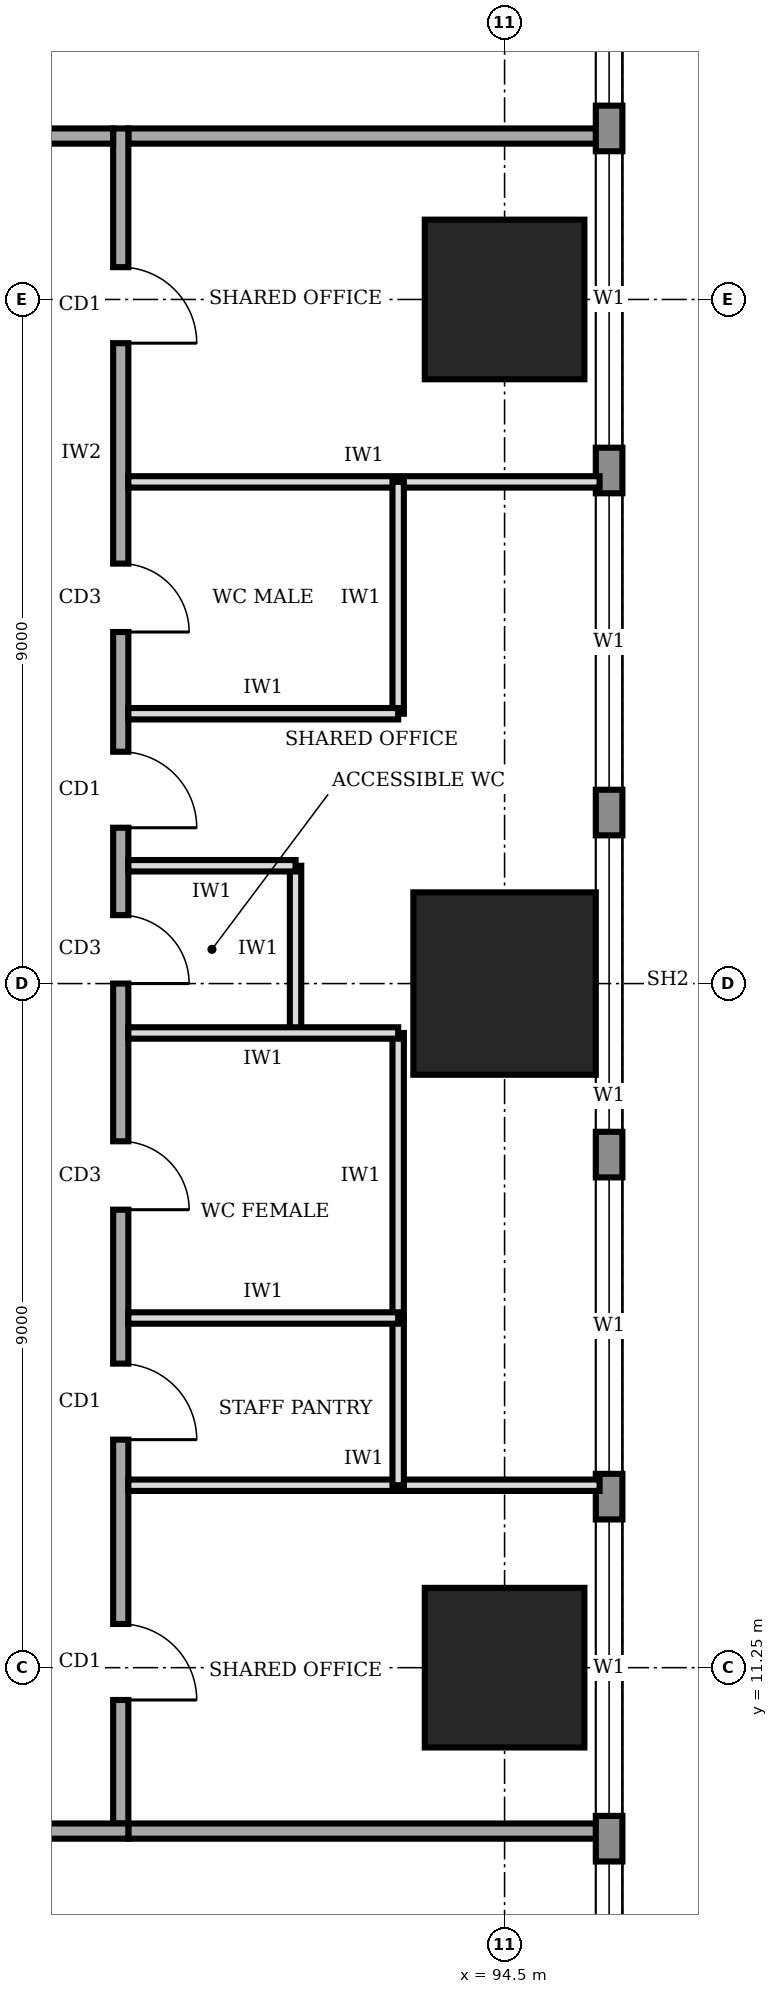
"""IFC4 building model, lengths in metres.
Left out: names, types, materials, properties, quantities, classifications, styles, units other than length and angle.
Written with IfcOpenShell. Run it as: python <this file> out.ifc"""

import sys

from ifc_helpers import new_model, si_unit, direction, frame, frame_2d, origin, origin_2d, place, context, subcontext, project, spatial, rectangle, extrude, element, fill, save


model = new_model("IFC4")
c1 = context("Model", 3, precision=1e-05, world=origin(), true_north=direction((0.0, 1.0)))
c2 = subcontext(c1, "Body", "Model", "MODEL_VIEW")
j1 = project(units=[si_unit("LENGTHUNIT", "METRE"), si_unit("PLANEANGLEUNIT", "RADIAN")], contexts=[c1])
p1 = place(None, origin())
s1 = spatial("IfcSite", under=j1, at=p1, CompositionType="ELEMENT")
p2 = place(p1, origin())
s2 = spatial("IfcBuilding", under=s1, at=p2, CompositionType="ELEMENT")
p3 = place(p2, frame((0.0, 0.0, 121.0)))
s3 = spatial("IfcBuildingStorey", under=s2, at=p3, CompositionType="ELEMENT", Elevation=121.0)
p4 = place(p3, frame((94.5, 11.25, 0.0), z_axis=(0.0, 0.0, 1.0), x_axis=(1.0, 0.0, 0.0)))
e1 = element("IfcColumn", 1, at=p4, inside=s3, PredefinedType="COLUMN", context=c2, shape_type="SweptSolid", body=[
    extrude(rectangle(XDim=2.1, YDim=2.1, at=origin_2d()), origin(), (0.0, 0.0, 1.0), 4.0),
])
p5 = place(p3, frame((94.5, 20.25, 0.0), z_axis=(0.0, 0.0, 1.0), x_axis=(1.0, 0.0, 0.0)))
e2 = element("IfcColumn", 2, at=p5, inside=s3, PredefinedType="COLUMN", context=c2, shape_type="SweptSolid", body=[
    extrude(rectangle(XDim=2.4, YDim=2.4, at=origin_2d()), origin(), (0.0, 0.0, 1.0), 4.0),
])
p6 = place(p3, frame((94.5, 29.25, 0.0), z_axis=(0.0, 0.0, 1.0), x_axis=(1.0, 0.0, 0.0)))
e3 = element("IfcColumn", 3, at=p6, inside=s3, PredefinedType="COLUMN", context=c2, shape_type="SweptSolid", body=[
    extrude(rectangle(XDim=2.1, YDim=2.1, at=origin_2d()), origin(), (0.0, 0.0, 1.0), 4.0),
])
p7 = place(p3, frame((95.875, 3.32, 0.0), z_axis=(0.0, 0.0, 1.0), x_axis=(0.0, 1.0, 0.0)))
e4 = element("IfcWall", 4, at=p7, inside=s3, PredefinedType="STANDARD", context=c2, shape_type="SweptSolid", body=[
    extrude(rectangle(XDim=33.96, YDim=0.35, at=frame_2d((16.98, 0.0))), origin(), (0.0, 0.0, 1.0), 3.75),
])
p8 = place(p7, frame((1.48, 0.0, 0.9)))
e5 = element("IfcOpeningElement", 5, at=p8, cuts=e4, PredefinedType="OPENING", context=c2, shape_type="SweptSolid", body=[
    extrude(rectangle(XDim=3.9, YDim=2.2, at=frame_2d((1.95, 1.1))), frame((0.0, 0.185, 0.0), z_axis=(0.0, -1.0, 0.0), x_axis=(1.0, 0.0, 0.0)), (0.0, 0.0, 1.0), 0.37),
])
p9 = place(p7, frame((5.98, 0.0, 0.9)))
e6 = element("IfcOpeningElement", 6, at=p9, cuts=e4, PredefinedType="OPENING", context=c2, shape_type="SweptSolid", body=[
    extrude(rectangle(XDim=3.9, YDim=2.2, at=frame_2d((1.95, 1.1))), frame((0.0, 0.185, 0.0), z_axis=(0.0, -1.0, 0.0), x_axis=(1.0, 0.0, 0.0)), (0.0, 0.0, 1.0), 0.37),
])
p10 = place(p7, frame((10.48, 0.0, 0.9)))
e7 = element("IfcOpeningElement", 7, at=p10, cuts=e4, PredefinedType="OPENING", context=c2, shape_type="SweptSolid", body=[
    extrude(rectangle(XDim=3.9, YDim=2.2, at=frame_2d((1.95, 1.1))), frame((0.0, 0.185, 0.0), z_axis=(0.0, -1.0, 0.0), x_axis=(1.0, 0.0, 0.0)), (0.0, 0.0, 1.0), 0.37),
])
p11 = place(p7, frame((14.98, 0.0, 0.9)))
e8 = element("IfcOpeningElement", 8, at=p11, cuts=e4, PredefinedType="OPENING", context=c2, shape_type="SweptSolid", body=[
    extrude(rectangle(XDim=3.9, YDim=2.2, at=frame_2d((1.95, 1.1))), frame((0.0, 0.185, 0.0), z_axis=(0.0, -1.0, 0.0), x_axis=(1.0, 0.0, 0.0)), (0.0, 0.0, 1.0), 0.37),
])
p12 = place(p7, frame((19.48, 0.0, 0.9)))
e9 = element("IfcOpeningElement", 9, at=p12, cuts=e4, PredefinedType="OPENING", context=c2, shape_type="SweptSolid", body=[
    extrude(rectangle(XDim=3.9, YDim=2.2, at=frame_2d((1.95, 1.1))), frame((0.0, 0.185, 0.0), z_axis=(0.0, -1.0, 0.0), x_axis=(1.0, 0.0, 0.0)), (0.0, 0.0, 1.0), 0.37),
])
p13 = place(p7, frame((23.98, 0.0, 0.9)))
e10 = element("IfcOpeningElement", 10, at=p13, cuts=e4, PredefinedType="OPENING", context=c2, shape_type="SweptSolid", body=[
    extrude(rectangle(XDim=3.9, YDim=2.2, at=frame_2d((1.95, 1.1))), frame((0.0, 0.185, 0.0), z_axis=(0.0, -1.0, 0.0), x_axis=(1.0, 0.0, 0.0)), (0.0, 0.0, 1.0), 0.37),
])
p14 = place(p7, frame((28.48, 0.0, 0.9)))
e11 = element("IfcOpeningElement", 11, at=p14, cuts=e4, PredefinedType="OPENING", context=c2, shape_type="SweptSolid", body=[
    extrude(rectangle(XDim=3.9, YDim=2.2, at=frame_2d((1.95, 1.1))), frame((0.0, 0.185, 0.0), z_axis=(0.0, -1.0, 0.0), x_axis=(1.0, 0.0, 0.0)), (0.0, 0.0, 1.0), 0.37),
])
p15 = place(p3, frame((71.15, 9.1, 0.0), z_axis=(0.0, 0.0, 1.0), x_axis=(1.0, 0.0, 0.0)))
e12 = element("IfcWall", 12, at=p15, inside=s3, PredefinedType="SOLIDWALL", context=c2, shape_type="SweptSolid", body=[
    extrude(rectangle(XDim=18.4, YDim=0.2, at=frame_2d((9.2, 0.0))), origin(), (0.0, 0.0, 1.0), 3.75),
])
p16 = place(p15, frame((2.075, 0.0, 0.0)))
e13 = element("IfcOpeningElement", 13, at=p16, cuts=e12, PredefinedType="OPENING", context=c2, shape_type="SweptSolid", body=[
    extrude(rectangle(XDim=1.0, YDim=2.1, at=frame_2d((0.5, 1.05))), frame((0.0, 0.11, 0.0), z_axis=(0.0, -1.0, 0.0), x_axis=(1.0, 0.0, 0.0)), (0.0, 0.0, 1.0), 0.22),
])
p17 = place(p15, frame((9.35, 0.0, 0.0)))
e14 = element("IfcOpeningElement", 14, at=p17, cuts=e12, PredefinedType="OPENING", context=c2, shape_type="SweptSolid", body=[
    extrude(rectangle(XDim=1.0, YDim=2.1, at=frame_2d((0.5, 1.05))), frame((0.0, 0.11, 0.0), z_axis=(0.0, -1.0, 0.0), x_axis=(1.0, 0.0, 0.0)), (0.0, 0.0, 1.0), 0.22),
])
p18 = place(p15, frame((15.875, 0.0, 0.0)))
e15 = element("IfcOpeningElement", 15, at=p18, cuts=e12, PredefinedType="OPENING", context=c2, shape_type="SweptSolid", body=[
    extrude(rectangle(XDim=1.0, YDim=2.1, at=frame_2d((0.5, 1.05))), frame((0.0, 0.11, 0.0), z_axis=(0.0, -1.0, 0.0), x_axis=(1.0, 0.0, 0.0)), (0.0, 0.0, 1.0), 0.22),
])
p19 = place(p3, frame((89.45, 9.2, 0.0), z_axis=(0.0, 0.0, 1.0), x_axis=(0.0, 1.0, 0.0)))
e16 = element("IfcWall", 16, at=p19, inside=s3, PredefinedType="SOLIDWALL", context=c2, shape_type="SweptSolid", body=[
    extrude(rectangle(XDim=22.3, YDim=0.2, at=frame_2d((11.15, 0.0))), origin(), (0.0, 0.0, 1.0), 3.75),
])
p20 = place(p19, frame((1.625, 0.0, 0.0)))
e17 = element("IfcOpeningElement", 17, at=p20, cuts=e16, PredefinedType="OPENING", context=c2, shape_type="SweptSolid", body=[
    extrude(rectangle(XDim=1.0, YDim=2.1, at=frame_2d((0.5, 1.05))), frame((0.0, 0.11, 0.0), z_axis=(0.0, -1.0, 0.0), x_axis=(1.0, 0.0, 0.0)), (0.0, 0.0, 1.0), 0.22),
])
p21 = place(p19, frame((5.05, 0.0, 0.0)))
e18 = element("IfcOpeningElement", 18, at=p21, cuts=e16, PredefinedType="OPENING", context=c2, shape_type="SweptSolid", body=[
    extrude(rectangle(XDim=1.0, YDim=2.1, at=frame_2d((0.5, 1.05))), frame((0.0, 0.11, 0.0), z_axis=(0.0, -1.0, 0.0), x_axis=(1.0, 0.0, 0.0)), (0.0, 0.0, 1.0), 0.22),
])
p22 = place(p19, frame((8.075, 0.0, 0.0)))
e19 = element("IfcOpeningElement", 19, at=p22, cuts=e16, PredefinedType="OPENING", context=c2, shape_type="SweptSolid", body=[
    extrude(rectangle(XDim=0.9, YDim=2.1, at=frame_2d((0.45, 1.05))), frame((0.0, 0.11, 0.0), z_axis=(0.0, -1.0, 0.0), x_axis=(1.0, 0.0, 0.0)), (0.0, 0.0, 1.0), 0.22),
])
p23 = place(p19, frame((11.05, 0.0, 0.0)))
e20 = element("IfcOpeningElement", 20, at=p23, cuts=e16, PredefinedType="OPENING", context=c2, shape_type="SweptSolid", body=[
    extrude(rectangle(XDim=0.9, YDim=2.1, at=frame_2d((0.45, 1.05))), frame((0.0, 0.11, 0.0), z_axis=(0.0, -1.0, 0.0), x_axis=(1.0, 0.0, 0.0)), (0.0, 0.0, 1.0), 0.22),
])
p24 = place(p19, frame((15.675, 0.0, 0.0)))
e21 = element("IfcOpeningElement", 21, at=p24, cuts=e16, PredefinedType="OPENING", context=c2, shape_type="SweptSolid", body=[
    extrude(rectangle(XDim=0.9, YDim=2.1, at=frame_2d((0.45, 1.05))), frame((0.0, 0.11, 0.0), z_axis=(0.0, -1.0, 0.0), x_axis=(1.0, 0.0, 0.0)), (0.0, 0.0, 1.0), 0.22),
])
p25 = place(p19, frame((13.1, 0.0, 0.0)))
e22 = element("IfcOpeningElement", 22, at=p25, cuts=e16, PredefinedType="OPENING", context=c2, shape_type="SweptSolid", body=[
    extrude(rectangle(XDim=1.0, YDim=2.1, at=frame_2d((0.5, 1.05))), frame((0.0, 0.11, 0.0), z_axis=(0.0, -1.0, 0.0), x_axis=(1.0, 0.0, 0.0)), (0.0, 0.0, 1.0), 0.22),
])
p26 = place(p19, frame((19.475, 0.0, 0.0)))
e23 = element("IfcOpeningElement", 23, at=p26, cuts=e16, PredefinedType="OPENING", context=c2, shape_type="SweptSolid", body=[
    extrude(rectangle(XDim=1.0, YDim=2.1, at=frame_2d((0.5, 1.05))), frame((0.0, 0.11, 0.0), z_axis=(0.0, -1.0, 0.0), x_axis=(1.0, 0.0, 0.0)), (0.0, 0.0, 1.0), 0.22),
])
p27 = place(p3, frame((89.35, 31.4, 0.0), z_axis=(0.0, 0.0, 1.0), x_axis=(-1.0, 0.0, 0.0)))
e24 = element("IfcWall", 24, at=p27, inside=s3, PredefinedType="SOLIDWALL", context=c2, shape_type="SweptSolid", body=[
    extrude(rectangle(XDim=18.4, YDim=0.2, at=frame_2d((9.2, 0.0))), origin(), (0.0, 0.0, 1.0), 3.75),
])
p28 = place(p27, frame((14.725, 0.0, 0.0)))
e25 = element("IfcOpeningElement", 25, at=p28, cuts=e24, PredefinedType="OPENING", context=c2, shape_type="SweptSolid", body=[
    extrude(rectangle(XDim=1.8, YDim=2.1, at=frame_2d((0.9, 1.05))), frame((0.0, 0.11, 0.0), z_axis=(0.0, -1.0, 0.0), x_axis=(1.0, 0.0, 0.0)), (0.0, 0.0, 1.0), 0.22),
])
p29 = place(p27, frame((7.85, 0.0, 0.0)))
e26 = element("IfcOpeningElement", 26, at=p29, cuts=e24, PredefinedType="OPENING", context=c2, shape_type="SweptSolid", body=[
    extrude(rectangle(XDim=1.0, YDim=2.1, at=frame_2d((0.5, 1.05))), frame((0.0, 0.11, 0.0), z_axis=(0.0, -1.0, 0.0), x_axis=(1.0, 0.0, 0.0)), (0.0, 0.0, 1.0), 0.22),
])
p30 = place(p27, frame((1.325, 0.0, 0.0)))
e27 = element("IfcOpeningElement", 27, at=p30, cuts=e24, PredefinedType="OPENING", context=c2, shape_type="SweptSolid", body=[
    extrude(rectangle(XDim=1.0, YDim=2.1, at=frame_2d((0.5, 1.05))), frame((0.0, 0.11, 0.0), z_axis=(0.0, -1.0, 0.0), x_axis=(1.0, 0.0, 0.0)), (0.0, 0.0, 1.0), 0.22),
])
for number, where, z_axis, x_axis in (
    (28, (89.55, 9.1, 0.0), (0.0, 0.0, 1.0), (1.0, 0.0, 0.0)),
    (29, (89.55, 31.4, 0.0), (0.0, 0.0, 1.0), (1.0, 0.0, 0.0)),
):
    element("IfcWall", number, at=place(p3, frame(where, z_axis=z_axis, x_axis=x_axis)), inside=s3, PredefinedType="SOLIDWALL", context=c2, shape_type="SweptSolid", body=[
        extrude(rectangle(XDim=6.2, YDim=0.2, at=frame_2d((3.1, 0.0))), origin(), (0.0, 0.0, 1.0), 3.75),
    ])
for number, where, z_axis, x_axis in (
    (30, (89.55, 13.65, 0.0), (0.0, 0.0, 1.0), (1.0, 0.0, 0.0)),
    (31, (89.55, 26.85, 0.0), (0.0, 0.0, 1.0), (1.0, 0.0, 0.0)),
):
    element("IfcWall", number, at=place(p3, frame(where, z_axis=z_axis, x_axis=x_axis)), inside=s3, PredefinedType="PARTITIONING", context=c2, shape_type="SweptSolid", body=[
        extrude(rectangle(XDim=6.2, YDim=0.15, at=frame_2d((3.1, 0.0))), origin(), (0.0, 0.0, 1.0), 3.75),
    ])
p31 = place(p3, frame((89.55, 15.85, 0.0), z_axis=(0.0, 0.0, 1.0), x_axis=(1.0, 0.0, 0.0)))
e32 = element("IfcWall", 32, at=p31, inside=s3, PredefinedType="PARTITIONING", context=c2, shape_type="SweptSolid", body=[
    extrude(rectangle(XDim=3.55, YDim=0.15, at=frame_2d((1.775, 0.0))), origin(), (0.0, 0.0, 1.0), 3.75),
])
p32 = place(p3, frame((89.55, 19.6, 0.0), z_axis=(0.0, 0.0, 1.0), x_axis=(1.0, 0.0, 0.0)))
e33 = element("IfcWall", 33, at=p32, inside=s3, PredefinedType="PARTITIONING", context=c2, shape_type="SweptSolid", body=[
    extrude(rectangle(XDim=3.55, YDim=0.15, at=frame_2d((1.775, 0.0))), origin(), (0.0, 0.0, 1.0), 2.85),
])
p33 = place(p3, frame((89.55, 21.8, 0.0), z_axis=(0.0, 0.0, 1.0), x_axis=(1.0, 0.0, 0.0)))
e34 = element("IfcWall", 34, at=p33, inside=s3, PredefinedType="PARTITIONING", context=c2, shape_type="SweptSolid", body=[
    extrude(rectangle(XDim=2.2, YDim=0.15, at=frame_2d((1.1, 0.0))), origin(), (0.0, 0.0, 1.0), 3.75),
])
p34 = place(p3, frame((89.55, 23.8, 0.0), z_axis=(0.0, 0.0, 1.0), x_axis=(1.0, 0.0, 0.0)))
e35 = element("IfcWall", 35, at=p34, inside=s3, PredefinedType="PARTITIONING", context=c2, shape_type="SweptSolid", body=[
    extrude(rectangle(XDim=3.55, YDim=0.15, at=frame_2d((1.775, 0.0))), origin(), (0.0, 0.0, 1.0), 3.75),
])
p35 = place(p3, frame((93.1, 13.65, 0.0), z_axis=(0.0, 0.0, 1.0), x_axis=(0.0, 1.0, 0.0)))
e36 = element("IfcWall", 36, at=p35, inside=s3, PredefinedType="PARTITIONING", context=c2, shape_type="SweptSolid", body=[
    extrude(rectangle(XDim=2.2, YDim=0.15, at=frame_2d((1.1, 0.0))), origin(), (0.0, 0.0, 1.0), 3.75),
])
p36 = place(p3, frame((93.1, 15.85, 0.0), z_axis=(0.0, 0.0, 1.0), x_axis=(0.0, 1.0, 0.0)))
e37 = element("IfcWall", 37, at=p36, inside=s3, PredefinedType="PARTITIONING", context=c2, shape_type="SweptSolid", body=[
    extrude(rectangle(XDim=3.75, YDim=0.15, at=frame_2d((1.875, 0.0))), origin(), (0.0, 0.0, 1.0), 3.75),
])
p37 = place(p3, frame((91.75, 19.6, 0.0), z_axis=(0.0, 0.0, 1.0), x_axis=(0.0, 1.0, 0.0)))
e38 = element("IfcWall", 38, at=p37, inside=s3, PredefinedType="PARTITIONING", context=c2, shape_type="SweptSolid", body=[
    extrude(rectangle(XDim=2.2, YDim=0.15, at=frame_2d((1.1, 0.0))), origin(), (0.0, 0.0, 1.0), 3.75),
])
p38 = place(p3, frame((93.1, 23.8, 0.0), z_axis=(0.0, 0.0, 1.0), x_axis=(0.0, 1.0, 0.0)))
e39 = element("IfcWall", 39, at=p38, inside=s3, PredefinedType="PARTITIONING", context=c2, shape_type="SweptSolid", body=[
    extrude(rectangle(XDim=3.05, YDim=0.15, at=frame_2d((1.525, 0.0))), origin(), (0.0, 0.0, 1.0), 3.75),
])
p39 = place(p8, origin())
e40 = element("IfcWindow", 40, at=p39, inside=s3, PartitioningType="SINGLE_PANEL", PredefinedType="WINDOW", context=c2, shape_type="SweptSolid", body=[
    extrude(rectangle(XDim=3.9, YDim=2.2, at=frame_2d((1.95, 1.1))), frame((0.0, 0.03, 0.0), z_axis=(0.0, -1.0, 0.0), x_axis=(1.0, 0.0, 0.0)), (0.0, 0.0, 1.0), 0.06),
])
fill(e5, e40)
p40 = place(p9, origin())
e41 = element("IfcWindow", 41, at=p40, inside=s3, PartitioningType="SINGLE_PANEL", PredefinedType="WINDOW", context=c2, shape_type="SweptSolid", body=[
    extrude(rectangle(XDim=3.9, YDim=2.2, at=frame_2d((1.95, 1.1))), frame((0.0, 0.03, 0.0), z_axis=(0.0, -1.0, 0.0), x_axis=(1.0, 0.0, 0.0)), (0.0, 0.0, 1.0), 0.06),
])
fill(e6, e41)
p41 = place(p10, origin())
e42 = element("IfcWindow", 42, at=p41, inside=s3, PartitioningType="SINGLE_PANEL", PredefinedType="WINDOW", context=c2, shape_type="SweptSolid", body=[
    extrude(rectangle(XDim=3.9, YDim=2.2, at=frame_2d((1.95, 1.1))), frame((0.0, 0.03, 0.0), z_axis=(0.0, -1.0, 0.0), x_axis=(1.0, 0.0, 0.0)), (0.0, 0.0, 1.0), 0.06),
])
fill(e7, e42)
p42 = place(p11, origin())
e43 = element("IfcWindow", 43, at=p42, inside=s3, PartitioningType="SINGLE_PANEL", PredefinedType="WINDOW", context=c2, shape_type="SweptSolid", body=[
    extrude(rectangle(XDim=3.9, YDim=2.2, at=frame_2d((1.95, 1.1))), frame((0.0, 0.03, 0.0), z_axis=(0.0, -1.0, 0.0), x_axis=(1.0, 0.0, 0.0)), (0.0, 0.0, 1.0), 0.06),
])
fill(e8, e43)
p43 = place(p12, origin())
e44 = element("IfcWindow", 44, at=p43, inside=s3, PartitioningType="SINGLE_PANEL", PredefinedType="WINDOW", context=c2, shape_type="SweptSolid", body=[
    extrude(rectangle(XDim=3.9, YDim=2.2, at=frame_2d((1.95, 1.1))), frame((0.0, 0.03, 0.0), z_axis=(0.0, -1.0, 0.0), x_axis=(1.0, 0.0, 0.0)), (0.0, 0.0, 1.0), 0.06),
])
fill(e9, e44)
p44 = place(p13, origin())
e45 = element("IfcWindow", 45, at=p44, inside=s3, PartitioningType="SINGLE_PANEL", PredefinedType="WINDOW", context=c2, shape_type="SweptSolid", body=[
    extrude(rectangle(XDim=3.9, YDim=2.2, at=frame_2d((1.95, 1.1))), frame((0.0, 0.03, 0.0), z_axis=(0.0, -1.0, 0.0), x_axis=(1.0, 0.0, 0.0)), (0.0, 0.0, 1.0), 0.06),
])
fill(e10, e45)
p45 = place(p14, origin())
e46 = element("IfcWindow", 46, at=p45, inside=s3, PartitioningType="SINGLE_PANEL", PredefinedType="WINDOW", context=c2, shape_type="SweptSolid", body=[
    extrude(rectangle(XDim=3.9, YDim=2.2, at=frame_2d((1.95, 1.1))), frame((0.0, 0.03, 0.0), z_axis=(0.0, -1.0, 0.0), x_axis=(1.0, 0.0, 0.0)), (0.0, 0.0, 1.0), 0.06),
])
fill(e11, e46)
p46 = place(p20, frame((1.0, 0.0, 0.0), z_axis=(0.0, 0.0, 1.0), x_axis=(-1.0, 0.0, 0.0)))
e47 = element("IfcDoor", 47, at=p46, inside=s3, OperationType="SINGLE_SWING_RIGHT", PredefinedType="DOOR", context=c2, shape_type="SweptSolid", body=[
    extrude(rectangle(XDim=1.0, YDim=2.1, at=frame_2d((0.5, 1.05))), frame((0.0, 0.025, 0.0), z_axis=(0.0, -1.0, 0.0), x_axis=(1.0, 0.0, 0.0)), (0.0, 0.0, 1.0), 0.05),
])
fill(e17, e47)
p47 = place(p21, frame((1.0, 0.0, 0.0), z_axis=(0.0, 0.0, 1.0), x_axis=(-1.0, 0.0, 0.0)))
e48 = element("IfcDoor", 48, at=p47, inside=s3, OperationType="SINGLE_SWING_RIGHT", PredefinedType="DOOR", context=c2, shape_type="SweptSolid", body=[
    extrude(rectangle(XDim=1.0, YDim=2.1, at=frame_2d((0.5, 1.05))), frame((0.0, 0.025, 0.0), z_axis=(0.0, -1.0, 0.0), x_axis=(1.0, 0.0, 0.0)), (0.0, 0.0, 1.0), 0.05),
])
fill(e18, e48)
p48 = place(p22, frame((0.9, 0.0, 0.0), z_axis=(0.0, 0.0, 1.0), x_axis=(-1.0, 0.0, 0.0)))
e49 = element("IfcDoor", 49, at=p48, inside=s3, OperationType="SINGLE_SWING_RIGHT", PredefinedType="DOOR", context=c2, shape_type="SweptSolid", body=[
    extrude(rectangle(XDim=0.9, YDim=2.1, at=frame_2d((0.45, 1.05))), frame((0.0, 0.025, 0.0), z_axis=(0.0, -1.0, 0.0), x_axis=(1.0, 0.0, 0.0)), (0.0, 0.0, 1.0), 0.05),
])
fill(e19, e49)
p49 = place(p23, frame((0.9, 0.0, 0.0), z_axis=(0.0, 0.0, 1.0), x_axis=(-1.0, 0.0, 0.0)))
e50 = element("IfcDoor", 50, at=p49, inside=s3, OperationType="SINGLE_SWING_RIGHT", PredefinedType="DOOR", context=c2, shape_type="SweptSolid", body=[
    extrude(rectangle(XDim=0.9, YDim=2.1, at=frame_2d((0.45, 1.05))), frame((0.0, 0.025, 0.0), z_axis=(0.0, -1.0, 0.0), x_axis=(1.0, 0.0, 0.0)), (0.0, 0.0, 1.0), 0.05),
])
fill(e20, e50)
p50 = place(p24, frame((0.9, 0.0, 0.0), z_axis=(0.0, 0.0, 1.0), x_axis=(-1.0, 0.0, 0.0)))
e51 = element("IfcDoor", 51, at=p50, inside=s3, OperationType="SINGLE_SWING_RIGHT", PredefinedType="DOOR", context=c2, shape_type="SweptSolid", body=[
    extrude(rectangle(XDim=0.9, YDim=2.1, at=frame_2d((0.45, 1.05))), frame((0.0, 0.025, 0.0), z_axis=(0.0, -1.0, 0.0), x_axis=(1.0, 0.0, 0.0)), (0.0, 0.0, 1.0), 0.05),
])
fill(e21, e51)
p51 = place(p25, frame((1.0, 0.0, 0.0), z_axis=(0.0, 0.0, 1.0), x_axis=(-1.0, 0.0, 0.0)))
e52 = element("IfcDoor", 52, at=p51, inside=s3, OperationType="SINGLE_SWING_RIGHT", PredefinedType="DOOR", context=c2, shape_type="SweptSolid", body=[
    extrude(rectangle(XDim=1.0, YDim=2.1, at=frame_2d((0.5, 1.05))), frame((0.0, 0.025, 0.0), z_axis=(0.0, -1.0, 0.0), x_axis=(1.0, 0.0, 0.0)), (0.0, 0.0, 1.0), 0.05),
])
fill(e22, e52)
p52 = place(p26, frame((1.0, 0.0, 0.0), z_axis=(0.0, 0.0, 1.0), x_axis=(-1.0, 0.0, 0.0)))
e53 = element("IfcDoor", 53, at=p52, inside=s3, OperationType="SINGLE_SWING_RIGHT", PredefinedType="DOOR", context=c2, shape_type="SweptSolid", body=[
    extrude(rectangle(XDim=1.0, YDim=2.1, at=frame_2d((0.5, 1.05))), frame((0.0, 0.025, 0.0), z_axis=(0.0, -1.0, 0.0), x_axis=(1.0, 0.0, 0.0)), (0.0, 0.0, 1.0), 0.05),
])
fill(e23, e53)
save(model, sys.argv[1])
